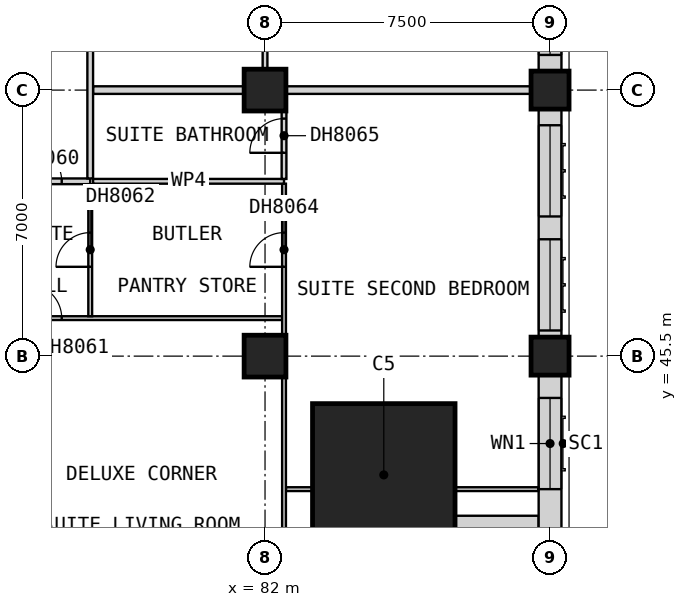
"""IFC4 building model, lengths in metres.
Left out: names, types, materials, properties, quantities, classifications, styles, units other than length and angle.
Written with IfcOpenShell. Run it as: python <this file> out.ifc"""

import sys

from ifc_helpers import new_model, si_unit, direction, frame, frame_2d, origin, origin_2d, place, context, subcontext, project, spatial, rectangle, extrude, element, fill, save


model = new_model("IFC4")
c1 = context("Model", 3, precision=1e-05, world=origin(), true_north=direction((0.0, 1.0)))
c2 = subcontext(c1, "Body", "Model", "MODEL_VIEW")
j1 = project(units=[si_unit("LENGTHUNIT", "METRE"), si_unit("PLANEANGLEUNIT", "RADIAN")], contexts=[c1])
p1 = place(None, origin())
s1 = spatial("IfcSite", under=j1, at=p1, CompositionType="ELEMENT")
p2 = place(p1, origin())
s2 = spatial("IfcBuilding", under=s1, at=p2, CompositionType="ELEMENT")
p3 = place(p2, frame((0.0, 0.0, 89.9)))
s3 = spatial("IfcBuildingStorey", under=s2, at=p3, CompositionType="ELEMENT", Elevation=89.9)
for number, where, z_axis, x_axis in (
    (1, (82.0, 45.5, 0.0), (0.0, 0.0, 1.0), (1.0, 0.0, 0.0)),
    (2, (82.0, 52.5, 0.0), (0.0, 0.0, 1.0), (1.0, 0.0, 0.0)),
):
    element("IfcColumn", number, at=place(p3, frame(where, z_axis=z_axis, x_axis=x_axis)), inside=s3, PredefinedType="COLUMN", context=c2, shape_type="SweptSolid", body=[
        extrude(rectangle(XDim=1.1, YDim=1.1, at=origin_2d()), origin(), (0.0, 0.0, 1.0), 3.6),
    ])
for number, where, z_axis, x_axis in (
    (3, (89.5, 45.5, 0.0), (0.0, 0.0, 1.0), (1.0, 0.0, 0.0)),
    (4, (89.5, 52.5, 0.0), (0.0, 0.0, 1.0), (1.0, 0.0, 0.0)),
):
    element("IfcColumn", number, at=place(p3, frame(where, z_axis=z_axis, x_axis=x_axis)), inside=s3, PredefinedType="COLUMN", context=c2, shape_type="SweptSolid", body=[
        extrude(rectangle(XDim=1.0, YDim=1.0, at=origin_2d()), origin(), (0.0, 0.0, 1.0), 3.6),
    ])
p4 = place(p3, frame((85.125, 42.375, 0.0), z_axis=(0.0, 0.0, 1.0), x_axis=(1.0, 0.0, 0.0)))
e5 = element("IfcColumn", 5, at=p4, inside=s3, PredefinedType="COLUMN", context=c2, shape_type="SweptSolid", body=[
    extrude(rectangle(XDim=3.75, YDim=3.75, at=origin_2d()), origin(), (0.0, 0.0, 1.0), 3.6),
])
p5 = place(p3, frame((87.0, 41.0, 0.0), z_axis=(0.0, 0.0, 1.0), x_axis=(1.0, 0.0, 0.0)))
e6 = element("IfcWall", 6, at=p5, inside=s3, PredefinedType="SOLIDWALL", context=c2, shape_type="SweptSolid", body=[
    extrude(rectangle(XDim=2.2, YDim=0.6, at=frame_2d((1.1, 0.0))), origin(), (0.0, 0.0, 1.0), 3.35),
])
p6 = place(p3, frame((89.5, 40.5, 0.0), z_axis=(0.0, 0.0, 1.0), x_axis=(0.0, 1.0, 0.0)))
e7 = element("IfcWall", 7, at=p6, inside=s3, PredefinedType="SOLIDWALL", context=c2, shape_type="SweptSolid", body=[
    extrude(rectangle(XDim=4.5, YDim=0.6, at=frame_2d((2.25, 0.0))), origin(), (0.0, 0.0, 1.0), 2.85),
])
p7 = place(p6, frame((1.5, 0.0, 0.8)))
e8 = element("IfcOpeningElement", 8, at=p7, cuts=e7, PredefinedType="OPENING", context=c2, shape_type="SweptSolid", body=[
    extrude(rectangle(XDim=2.4, YDim=1.8, at=frame_2d((1.2, 0.9))), frame((0.0, 0.31, 0.0), z_axis=(0.0, -1.0, 0.0), x_axis=(1.0, 0.0, 0.0)), (0.0, 0.0, 1.0), 0.62),
])
p8 = place(p3, frame((89.5, 46.0, 0.0), z_axis=(0.0, 0.0, 1.0), x_axis=(0.0, 1.0, 0.0)))
e9 = element("IfcWall", 9, at=p8, inside=s3, PredefinedType="SOLIDWALL", context=c2, shape_type="SweptSolid", body=[
    extrude(rectangle(XDim=6.0, YDim=0.6, at=frame_2d((3.0, 0.0))), origin(), (0.0, 0.0, 1.0), 2.85),
])
p9 = place(p8, frame((0.175, 0.0, 0.8)))
e10 = element("IfcOpeningElement", 10, at=p9, cuts=e9, PredefinedType="OPENING", context=c2, shape_type="SweptSolid", body=[
    extrude(rectangle(XDim=2.4, YDim=1.8, at=frame_2d((1.2, 0.9))), frame((0.0, 0.31, 0.0), z_axis=(0.0, -1.0, 0.0), x_axis=(1.0, 0.0, 0.0)), (0.0, 0.0, 1.0), 0.62),
])
p10 = place(p8, frame((3.175, 0.0, 0.8)))
e11 = element("IfcOpeningElement", 11, at=p10, cuts=e9, PredefinedType="OPENING", context=c2, shape_type="SweptSolid", body=[
    extrude(rectangle(XDim=2.4, YDim=1.8, at=frame_2d((1.2, 0.9))), frame((0.0, 0.31, 0.0), z_axis=(0.0, -1.0, 0.0), x_axis=(1.0, 0.0, 0.0)), (0.0, 0.0, 1.0), 0.62),
])
p11 = place(p3, frame((89.5, 53.0, 0.0), z_axis=(0.0, 0.0, 1.0), x_axis=(0.0, 1.0, 0.0)))
e12 = element("IfcWall", 12, at=p11, inside=s3, PredefinedType="SOLIDWALL", context=c2, shape_type="SweptSolid", body=[
    extrude(rectangle(XDim=6.5, YDim=0.6, at=frame_2d((3.25, 0.0))), origin(), (0.0, 0.0, 1.0), 2.85),
])
p12 = place(p11, frame((0.425, 0.0, 0.8)))
e13 = element("IfcOpeningElement", 13, at=p12, cuts=e12, PredefinedType="OPENING", context=c2, shape_type="SweptSolid", body=[
    extrude(rectangle(XDim=2.4, YDim=1.8, at=frame_2d((1.2, 0.9))), frame((0.0, 0.31, 0.0), z_axis=(0.0, -1.0, 0.0), x_axis=(1.0, 0.0, 0.0)), (0.0, 0.0, 1.0), 0.62),
])
p13 = place(p11, frame((3.675, 0.0, 0.8)))
e14 = element("IfcOpeningElement", 14, at=p13, cuts=e12, PredefinedType="OPENING", context=c2, shape_type="SweptSolid", body=[
    extrude(rectangle(XDim=2.4, YDim=1.8, at=frame_2d((1.2, 0.9))), frame((0.0, 0.31, 0.0), z_axis=(0.0, -1.0, 0.0), x_axis=(1.0, 0.0, 0.0)), (0.0, 0.0, 1.0), 0.62),
])
p14 = place(p3, frame((77.475, 52.5, 0.0), z_axis=(0.0, 0.0, 1.0), x_axis=(1.0, 0.0, 0.0)))
e15 = element("IfcWall", 15, at=p14, inside=s3, PredefinedType="PARTITIONING", context=c2, shape_type="SweptSolid", body=[
    extrude(rectangle(XDim=12.525, YDim=0.2, at=frame_2d((6.262, 0.0))), origin(), (0.0, 0.0, 1.0), 3.35),
])
p15 = place(p3, frame((33.75, 50.1, 0.0), z_axis=(0.0, 0.0, 1.0), x_axis=(1.0, 0.0, 0.0)))
e16 = element("IfcWall", 16, at=p15, inside=s3, PredefinedType="PARTITIONING", context=c2, shape_type="SweptSolid", body=[
    extrude(rectangle(XDim=43.65, YDim=0.15, at=frame_2d((21.825, 0.0))), origin(), (0.0, 0.0, 1.0), 3.35),
])
p16 = place(p15, frame((5.175, 0.0, 0.0)))
e17 = element("IfcOpeningElement", 17, at=p16, cuts=e16, PredefinedType="OPENING", context=c2, shape_type="SweptSolid", body=[
    extrude(rectangle(XDim=0.9, YDim=2.1, at=frame_2d((0.45, 1.05))), frame((0.0, 0.085, 0.0), z_axis=(0.0, -1.0, 0.0), x_axis=(1.0, 0.0, 0.0)), (0.0, 0.0, 1.0), 0.17),
])
p17 = place(p15, frame((13.05, 0.0, 0.0)))
e18 = element("IfcOpeningElement", 18, at=p17, cuts=e16, PredefinedType="OPENING", context=c2, shape_type="SweptSolid", body=[
    extrude(rectangle(XDim=0.9, YDim=2.1, at=frame_2d((0.45, 1.05))), frame((0.0, 0.085, 0.0), z_axis=(0.0, -1.0, 0.0), x_axis=(1.0, 0.0, 0.0)), (0.0, 0.0, 1.0), 0.17),
])
p18 = place(p15, frame((17.363, 0.0, 0.0)))
e19 = element("IfcOpeningElement", 19, at=p18, cuts=e16, PredefinedType="OPENING", context=c2, shape_type="SweptSolid", body=[
    extrude(rectangle(XDim=0.9, YDim=2.1, at=frame_2d((0.45, 1.05))), frame((0.0, 0.085, 0.0), z_axis=(0.0, -1.0, 0.0), x_axis=(1.0, 0.0, 0.0)), (0.0, 0.0, 1.0), 0.17),
])
p19 = place(p15, frame((21.113, 0.0, 0.0)))
e20 = element("IfcOpeningElement", 20, at=p19, cuts=e16, PredefinedType="OPENING", context=c2, shape_type="SweptSolid", body=[
    extrude(rectangle(XDim=0.9, YDim=2.1, at=frame_2d((0.45, 1.05))), frame((0.0, 0.085, 0.0), z_axis=(0.0, -1.0, 0.0), x_axis=(1.0, 0.0, 0.0)), (0.0, 0.0, 1.0), 0.17),
])
p20 = place(p15, frame((28.05, 0.0, 0.0)))
e21 = element("IfcOpeningElement", 21, at=p20, cuts=e16, PredefinedType="OPENING", context=c2, shape_type="SweptSolid", body=[
    extrude(rectangle(XDim=0.9, YDim=2.1, at=frame_2d((0.45, 1.05))), frame((0.0, 0.085, 0.0), z_axis=(0.0, -1.0, 0.0), x_axis=(1.0, 0.0, 0.0)), (0.0, 0.0, 1.0), 0.17),
])
p21 = place(p15, frame((32.363, 0.0, 0.0)))
e22 = element("IfcOpeningElement", 22, at=p21, cuts=e16, PredefinedType="OPENING", context=c2, shape_type="SweptSolid", body=[
    extrude(rectangle(XDim=0.9, YDim=2.1, at=frame_2d((0.45, 1.05))), frame((0.0, 0.085, 0.0), z_axis=(0.0, -1.0, 0.0), x_axis=(1.0, 0.0, 0.0)), (0.0, 0.0, 1.0), 0.17),
])
p22 = place(p15, frame((39.3, 0.0, 0.0)))
e23 = element("IfcOpeningElement", 23, at=p22, cuts=e16, PredefinedType="OPENING", context=c2, shape_type="SweptSolid", body=[
    extrude(rectangle(XDim=0.9, YDim=2.1, at=frame_2d((0.45, 1.05))), frame((0.0, 0.085, 0.0), z_axis=(0.0, -1.0, 0.0), x_axis=(1.0, 0.0, 0.0)), (0.0, 0.0, 1.0), 0.17),
])
p23 = place(p15, frame((42.0, 0.0, 0.0)))
e24 = element("IfcOpeningElement", 24, at=p23, cuts=e16, PredefinedType="OPENING", context=c2, shape_type="SweptSolid", body=[
    extrude(rectangle(XDim=0.9, YDim=2.1, at=frame_2d((0.45, 1.05))), frame((0.0, 0.085, 0.0), z_axis=(0.0, -1.0, 0.0), x_axis=(1.0, 0.0, 0.0)), (0.0, 0.0, 1.0), 0.17),
])
p24 = place(p3, frame((77.4, 50.175, 0.0), z_axis=(0.0, 0.0, 1.0), x_axis=(0.0, 1.0, 0.0)))
e25 = element("IfcWall", 25, at=p24, inside=s3, PredefinedType="PARTITIONING", context=c2, shape_type="SweptSolid", body=[
    extrude(rectangle(XDim=42.15, YDim=0.15, at=frame_2d((21.075, 0.0))), origin(), (0.0, 0.0, 1.0), 3.35),
])
p25 = place(p24, frame((7.875, 0.0, 0.0)))
e26 = element("IfcOpeningElement", 26, at=p25, cuts=e25, PredefinedType="OPENING", context=c2, shape_type="SweptSolid", body=[
    extrude(rectangle(XDim=0.9, YDim=2.1, at=frame_2d((0.45, 1.05))), frame((0.0, 0.085, 0.0), z_axis=(0.0, -1.0, 0.0), x_axis=(1.0, 0.0, 0.0)), (0.0, 0.0, 1.0), 0.17),
])
p26 = place(p24, frame((15.375, 0.0, 0.0)))
e27 = element("IfcOpeningElement", 27, at=p26, cuts=e25, PredefinedType="OPENING", context=c2, shape_type="SweptSolid", body=[
    extrude(rectangle(XDim=0.9, YDim=2.1, at=frame_2d((0.45, 1.05))), frame((0.0, 0.085, 0.0), z_axis=(0.0, -1.0, 0.0), x_axis=(1.0, 0.0, 0.0)), (0.0, 0.0, 1.0), 0.17),
])
p27 = place(p24, frame((30.375, 0.0, 0.0)))
e28 = element("IfcOpeningElement", 28, at=p27, cuts=e25, PredefinedType="OPENING", context=c2, shape_type="SweptSolid", body=[
    extrude(rectangle(XDim=0.9, YDim=2.1, at=frame_2d((0.45, 1.05))), frame((0.0, 0.085, 0.0), z_axis=(0.0, -1.0, 0.0), x_axis=(1.0, 0.0, 0.0)), (0.0, 0.0, 1.0), 0.17),
])
p28 = place(p3, frame((82.55, 42.0, 0.0), z_axis=(0.0, 0.0, 1.0), x_axis=(1.0, 0.0, 0.0)))
e29 = element("IfcWall", 29, at=p28, inside=s3, PredefinedType="PARTITIONING", context=c2, shape_type="SweptSolid", body=[
    extrude(rectangle(XDim=6.64, YDim=0.1, at=frame_2d((3.32, 0.0))), origin(), (0.0, 0.0, 1.0), 3.35),
])
p29 = place(p3, frame((75.1, 46.5, 0.0), z_axis=(0.0, 0.0, 1.0), x_axis=(1.0, 0.0, 0.0)))
e30 = element("IfcWall", 30, at=p29, inside=s3, PredefinedType="PARTITIONING", context=c2, shape_type="SweptSolid", body=[
    extrude(rectangle(XDim=7.35, YDim=0.1, at=frame_2d((3.675, 0.0))), origin(), (0.0, 0.0, 1.0), 3.35),
])
p30 = place(p29, frame((0.65, 0.0, 0.0)))
e31 = element("IfcOpeningElement", 31, at=p30, cuts=e30, PredefinedType="OPENING", context=c2, shape_type="SweptSolid", body=[
    extrude(rectangle(XDim=0.9, YDim=2.1, at=frame_2d((0.45, 1.05))), frame((0.0, 0.06, 0.0), z_axis=(0.0, -1.0, 0.0), x_axis=(1.0, 0.0, 0.0)), (0.0, 0.0, 1.0), 0.12),
])
p31 = place(p3, frame((77.4, 46.55, 0.0), z_axis=(0.0, 0.0, 1.0), x_axis=(0.0, 1.0, 0.0)))
e32 = element("IfcWall", 32, at=p31, inside=s3, PredefinedType="PARTITIONING", context=c2, shape_type="SweptSolid", body=[
    extrude(rectangle(XDim=3.475, YDim=0.1, at=frame_2d((1.737, 0.0))), origin(), (0.0, 0.0, 1.0), 3.35),
])
p32 = place(p31, frame((1.3, 0.0, 0.0)))
e33 = element("IfcOpeningElement", 33, at=p32, cuts=e32, PredefinedType="OPENING", context=c2, shape_type="SweptSolid", body=[
    extrude(rectangle(XDim=0.9, YDim=2.1, at=frame_2d((0.45, 1.05))), frame((0.0, 0.06, 0.0), z_axis=(0.0, -1.0, 0.0), x_axis=(1.0, 0.0, 0.0)), (0.0, 0.0, 1.0), 0.12),
])
p33 = place(p3, frame((82.5, 38.31, 0.0), z_axis=(0.0, 0.0, 1.0), x_axis=(0.0, 1.0, 0.0)))
e34 = element("IfcWall", 34, at=p33, inside=s3, PredefinedType="PARTITIONING", context=c2, shape_type="SweptSolid", body=[
    extrude(rectangle(XDim=11.728, YDim=0.1, at=frame_2d((5.864, 0.0))), origin(), (0.0, 0.0, 1.0), 3.35),
])
p34 = place(p33, frame((0.99, 0.0, 0.0)))
e35 = element("IfcOpeningElement", 35, at=p34, cuts=e34, PredefinedType="OPENING", context=c2, shape_type="SweptSolid", body=[
    extrude(rectangle(XDim=0.9, YDim=2.1, at=frame_2d((0.45, 1.05))), frame((0.0, 0.06, 0.0), z_axis=(0.0, -1.0, 0.0), x_axis=(1.0, 0.0, 0.0)), (0.0, 0.0, 1.0), 0.12),
])
p35 = place(p33, frame((9.54, 0.0, 0.0)))
e36 = element("IfcOpeningElement", 36, at=p35, cuts=e34, PredefinedType="OPENING", context=c2, shape_type="SweptSolid", body=[
    extrude(rectangle(XDim=0.9, YDim=2.1, at=frame_2d((0.45, 1.05))), frame((0.0, 0.06, 0.0), z_axis=(0.0, -1.0, 0.0), x_axis=(1.0, 0.0, 0.0)), (0.0, 0.0, 1.0), 0.12),
])
p36 = place(p3, frame((77.475, 50.1, 0.0), z_axis=(0.0, 0.0, 1.0), x_axis=(1.0, 0.0, 0.0)))
e37 = element("IfcWall", 37, at=p36, inside=s3, PredefinedType="PARTITIONING", context=c2, shape_type="SweptSolid", body=[
    extrude(rectangle(XDim=5.025, YDim=0.125, at=frame_2d((2.512, 0.0))), origin(), (0.0, 0.0, 1.0), 3.35),
])
p37 = place(p3, frame((82.0, 52.6, 0.0), z_axis=(0.0, 0.0, 1.0), x_axis=(0.0, 1.0, 0.0)))
e38 = element("IfcWall", 38, at=p37, inside=s3, PredefinedType="PARTITIONING", context=c2, shape_type="SweptSolid", body=[
    extrude(rectangle(XDim=4.337, YDim=0.125, at=frame_2d((2.169, 0.0))), origin(), (0.0, 0.0, 1.0), 3.35),
])
p38 = place(p37, frame((1.7, 0.0, 0.0)))
e39 = element("IfcOpeningElement", 39, at=p38, cuts=e38, PredefinedType="OPENING", context=c2, shape_type="SweptSolid", body=[
    extrude(rectangle(XDim=0.9, YDim=2.1, at=frame_2d((0.45, 1.05))), frame((0.0, 0.073, 0.0), z_axis=(0.0, -1.0, 0.0), x_axis=(1.0, 0.0, 0.0)), (0.0, 0.0, 1.0), 0.145),
])
p39 = place(p3, frame((82.5, 50.163, 0.0), z_axis=(0.0, 0.0, 1.0), x_axis=(0.0, 1.0, 0.0)))
e40 = element("IfcWall", 40, at=p39, inside=s3, PredefinedType="PARTITIONING", context=c2, shape_type="SweptSolid", body=[
    extrude(rectangle(XDim=2.237, YDim=0.125, at=frame_2d((1.119, 0.0))), origin(), (0.0, 0.0, 1.0), 3.35),
])
p40 = place(p39, frame((0.688, 0.0, 0.0)))
e41 = element("IfcOpeningElement", 41, at=p40, cuts=e40, PredefinedType="OPENING", context=c2, shape_type="SweptSolid", body=[
    extrude(rectangle(XDim=0.9, YDim=2.1, at=frame_2d((0.45, 1.05))), frame((0.0, 0.073, 0.0), z_axis=(0.0, -1.0, 0.0), x_axis=(1.0, 0.0, 0.0)), (0.0, 0.0, 1.0), 0.145),
])
p41 = place(p7, origin())
e42 = element("IfcWindow", 42, at=p41, inside=s3, PartitioningType="SINGLE_PANEL", PredefinedType="WINDOW", context=c2, shape_type="SweptSolid", body=[
    extrude(rectangle(XDim=2.4, YDim=1.8, at=frame_2d((1.2, 0.9))), frame((0.0, -0.07, 0.0), z_axis=(0.0, -1.0, 0.0), x_axis=(1.0, 0.0, 0.0)), (0.0, 0.0, 1.0), 0.06),
])
fill(e8, e42)
p42 = place(p9, origin())
e43 = element("IfcWindow", 43, at=p42, inside=s3, PartitioningType="SINGLE_PANEL", PredefinedType="WINDOW", context=c2, shape_type="SweptSolid", body=[
    extrude(rectangle(XDim=2.4, YDim=1.8, at=frame_2d((1.2, 0.9))), frame((0.0, -0.07, 0.0), z_axis=(0.0, -1.0, 0.0), x_axis=(1.0, 0.0, 0.0)), (0.0, 0.0, 1.0), 0.06),
])
fill(e10, e43)
p43 = place(p10, origin())
e44 = element("IfcWindow", 44, at=p43, inside=s3, PartitioningType="SINGLE_PANEL", PredefinedType="WINDOW", context=c2, shape_type="SweptSolid", body=[
    extrude(rectangle(XDim=2.4, YDim=1.8, at=frame_2d((1.2, 0.9))), frame((0.0, -0.07, 0.0), z_axis=(0.0, -1.0, 0.0), x_axis=(1.0, 0.0, 0.0)), (0.0, 0.0, 1.0), 0.06),
])
fill(e11, e44)
p44 = place(p12, origin())
e45 = element("IfcWindow", 45, at=p44, inside=s3, PartitioningType="SINGLE_PANEL", PredefinedType="WINDOW", context=c2, shape_type="SweptSolid", body=[
    extrude(rectangle(XDim=2.4, YDim=1.8, at=frame_2d((1.2, 0.9))), frame((0.0, -0.07, 0.0), z_axis=(0.0, -1.0, 0.0), x_axis=(1.0, 0.0, 0.0)), (0.0, 0.0, 1.0), 0.06),
])
fill(e13, e45)
p45 = place(p23, origin())
e46 = element("IfcDoor", 46, at=p45, inside=s3, OperationType="SINGLE_SWING_LEFT", PredefinedType="DOOR", context=c2, shape_type="SweptSolid", body=[
    extrude(rectangle(XDim=0.9, YDim=2.1, at=frame_2d((0.45, 1.05))), frame((0.0, 0.025, 0.0), z_axis=(0.0, -1.0, 0.0), x_axis=(1.0, 0.0, 0.0)), (0.0, 0.0, 1.0), 0.05),
])
fill(e24, e46)
p46 = place(p30, origin())
e47 = element("IfcDoor", 47, at=p46, inside=s3, OperationType="SINGLE_SWING_RIGHT", PredefinedType="DOOR", context=c2, shape_type="SweptSolid", body=[
    extrude(rectangle(XDim=0.9, YDim=2.1, at=frame_2d((0.45, 1.05))), frame((0.0, 0.025, 0.0), z_axis=(0.0, -1.0, 0.0), x_axis=(1.0, 0.0, 0.0)), (0.0, 0.0, 1.0), 0.05),
])
fill(e31, e47)
p47 = place(p32, origin())
e48 = element("IfcDoor", 48, at=p47, inside=s3, OperationType="SINGLE_SWING_RIGHT", PredefinedType="DOOR", context=c2, shape_type="SweptSolid", body=[
    extrude(rectangle(XDim=0.9, YDim=2.1, at=frame_2d((0.45, 1.05))), frame((0.0, 0.025, 0.0), z_axis=(0.0, -1.0, 0.0), x_axis=(1.0, 0.0, 0.0)), (0.0, 0.0, 1.0), 0.05),
])
fill(e33, e48)
p48 = place(p35, origin())
e49 = element("IfcDoor", 49, at=p48, inside=s3, OperationType="SINGLE_SWING_RIGHT", PredefinedType="DOOR", context=c2, shape_type="SweptSolid", body=[
    extrude(rectangle(XDim=0.9, YDim=2.1, at=frame_2d((0.45, 1.05))), frame((0.0, 0.025, 0.0), z_axis=(0.0, -1.0, 0.0), x_axis=(1.0, 0.0, 0.0)), (0.0, 0.0, 1.0), 0.05),
])
fill(e36, e49)
p49 = place(p40, origin())
e50 = element("IfcDoor", 50, at=p49, inside=s3, OperationType="SINGLE_SWING_LEFT", PredefinedType="DOOR", context=c2, shape_type="SweptSolid", body=[
    extrude(rectangle(XDim=0.9, YDim=2.1, at=frame_2d((0.45, 1.05))), frame((0.0, 0.025, 0.0), z_axis=(0.0, -1.0, 0.0), x_axis=(1.0, 0.0, 0.0)), (0.0, 0.0, 1.0), 0.05),
])
fill(e41, e50)
save(model, sys.argv[1])
